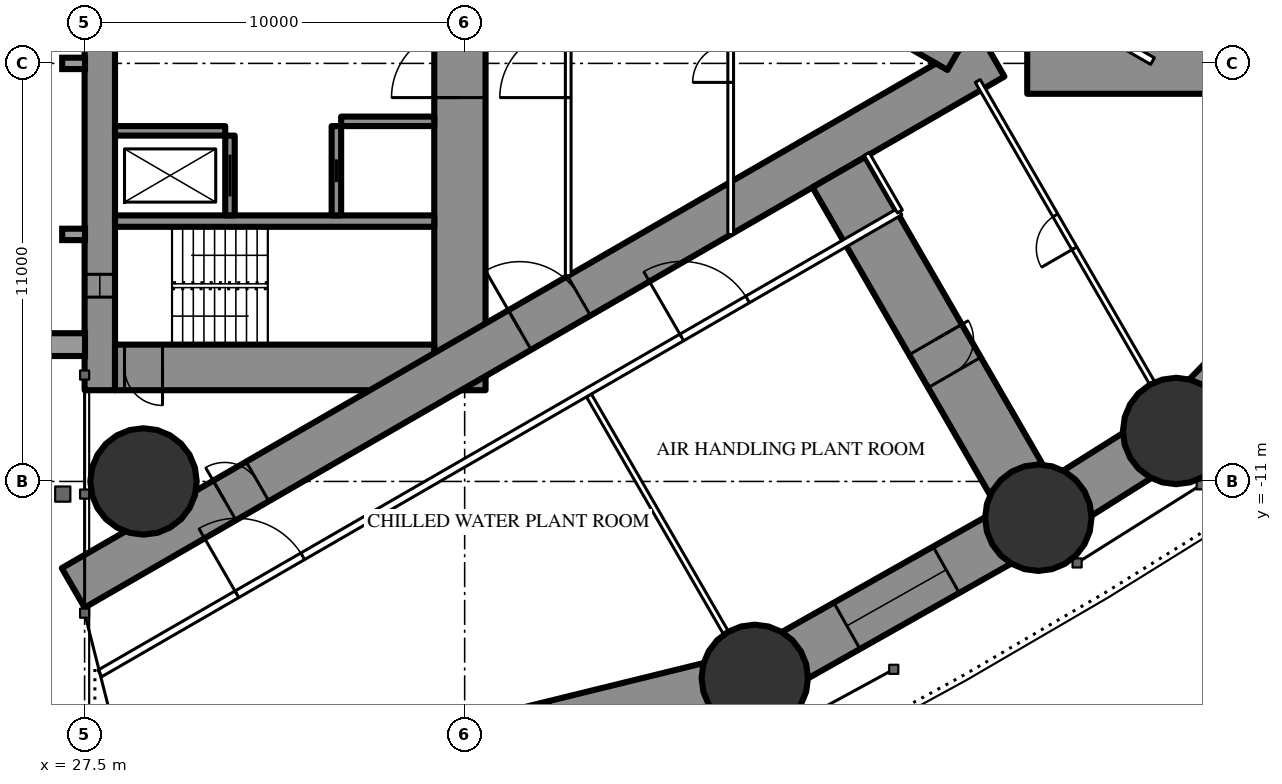
"""IFC4 building model, lengths in metres.
Left out: names, types, materials, properties, quantities, classifications, styles, units other than length and angle.
Written with IfcOpenShell. Run it as: python <this file> out.ifc"""

import sys

from ifc_helpers import new_model, si_unit, direction, frame, frame_2d, origin, origin_2d, place, context, subcontext, project, spatial, rectangle, circle, extrude, element, fill, save


model = new_model("IFC4")
c1 = context("Model", 3, precision=1e-05, world=origin(), true_north=direction((0.0, 1.0)))
c2 = subcontext(c1, "Body", "Model", "MODEL_VIEW")
j1 = project(units=[si_unit("LENGTHUNIT", "METRE"), si_unit("PLANEANGLEUNIT", "RADIAN")], contexts=[c1])
p1 = place(None, origin())
s1 = spatial("IfcSite", under=j1, at=p1, CompositionType="ELEMENT")
p2 = place(p1, origin())
s2 = spatial("IfcBuilding", under=s1, at=p2, CompositionType="ELEMENT")
p3 = place(p2, frame((0.0, 0.0, 152.7)))
s3 = spatial("IfcBuildingStorey", under=s2, at=p3, CompositionType="ELEMENT", Elevation=152.7)
for number, where, z_axis, x_axis in (
    (1, (29.05, -11.0, 0.0), (0.0, 0.0, 1.0), (1.0, 0.0, 0.0)),
    (2, (45.134, -16.168, 0.0), (0.0, 0.0, 1.0), (1.0, 0.0, 0.0)),
    (3, (52.594, -11.955, 0.0), (0.0, 0.0, 1.0), (1.0, 0.0, 0.0)),
    (4, (56.221, -9.672, 0.0), (0.0, 0.0, 1.0), (1.0, 0.0, 0.0)),
):
    element("IfcColumn", number, at=place(p3, frame(where, z_axis=z_axis, x_axis=x_axis)), inside=s3, PredefinedType="COLUMN", context=c2, shape_type="SweptSolid", body=[
        extrude(circle(Radius=1.4, at=origin_2d()), origin(), (0.0, 0.0, 1.0), 3.6),
    ])
p4 = place(p3, frame((27.9, -8.6, 0.0), z_axis=(0.0, 0.0, 1.0), x_axis=(0.0, 1.0, 0.0)))
e5 = element("IfcWall", 5, at=p4, inside=s3, PredefinedType="SHEAR", context=c2, shape_type="SweptSolid", body=[
    extrude(rectangle(XDim=17.2, YDim=0.8, at=frame_2d((8.6, 0.0))), origin(), (0.0, 0.0, 1.0), 3.6),
])
p5 = place(p4, frame((2.45, 0.0, 0.6)))
e6 = element("IfcOpeningElement", 6, at=p5, cuts=e5, PredefinedType="OPENING", context=c2, shape_type="SweptSolid", body=[
    extrude(rectangle(XDim=0.6, YDim=2.1, at=frame_2d((0.3, 1.05))), frame((0.0, 0.41, 0.0), z_axis=(0.0, -1.0, 0.0), x_axis=(1.0, 0.0, 0.0)), (0.0, 0.0, 1.0), 0.82),
])
p6 = place(p4, frame((14.15, 0.0, 0.6)))
e7 = element("IfcOpeningElement", 7, at=p6, cuts=e5, PredefinedType="OPENING", context=c2, shape_type="SweptSolid", body=[
    extrude(rectangle(XDim=0.6, YDim=2.1, at=frame_2d((0.3, 1.05))), frame((0.0, 0.41, 0.0), z_axis=(0.0, -1.0, 0.0), x_axis=(1.0, 0.0, 0.0)), (0.0, 0.0, 1.0), 0.82),
])
p7 = place(p3, frame((37.375, -8.6, 0.0), z_axis=(0.0, 0.0, 1.0), x_axis=(0.0, 1.0, 0.0)))
e8 = element("IfcWall", 8, at=p7, inside=s3, PredefinedType="SHEAR", context=c2, shape_type="SweptSolid", body=[
    extrude(rectangle(XDim=17.2, YDim=1.35, at=frame_2d((8.6, 0.0))), origin(), (0.0, 0.0, 1.0), 3.6),
])
p8 = place(p7, frame((7.7, 0.0, 0.0)))
e9 = element("IfcOpeningElement", 9, at=p8, cuts=e8, PredefinedType="OPENING", context=c2, shape_type="SweptSolid", body=[
    extrude(rectangle(XDim=1.8, YDim=2.2, at=frame_2d((0.9, 1.1))), frame((0.0, 0.685, 0.0), z_axis=(0.0, -1.0, 0.0), x_axis=(1.0, 0.0, 0.0)), (0.0, 0.0, 1.0), 1.37),
])
p9 = place(p3, frame((28.3, -8.0, 0.0), z_axis=(0.0, 0.0, 1.0), x_axis=(1.0, 0.0, 0.0)))
e10 = element("IfcWall", 10, at=p9, inside=s3, PredefinedType="SHEAR", context=c2, shape_type="SweptSolid", body=[
    extrude(rectangle(XDim=8.4, YDim=1.2, at=frame_2d((4.2, 0.0))), origin(), (0.0, 0.0, 1.0), 3.6),
])
p10 = place(p9, frame((0.25, 0.0, 0.0)))
e11 = element("IfcOpeningElement", 11, at=p10, cuts=e10, PredefinedType="OPENING", context=c2, shape_type="SweptSolid", body=[
    extrude(rectangle(XDim=1.0, YDim=2.2, at=frame_2d((0.5, 1.1))), frame((0.0, 0.61, 0.0), z_axis=(0.0, -1.0, 0.0), x_axis=(1.0, 0.0, 0.0)), (0.0, 0.0, 1.0), 1.22),
])
p11 = place(p3, frame((28.3, -4.15, 0.0), z_axis=(0.0, 0.0, 1.0), x_axis=(1.0, 0.0, 0.0)))
e12 = element("IfcWall", 12, at=p11, inside=s3, PredefinedType="SHEAR", context=c2, shape_type="SweptSolid", body=[
    extrude(rectangle(XDim=8.4, YDim=0.3, at=frame_2d((4.2, 0.0))), origin(), (0.0, 0.0, 1.0), 3.6),
])
p12 = place(p3, frame((31.325, -4.0, 0.0), z_axis=(0.0, 0.0, 1.0), x_axis=(0.0, 1.0, 0.0)))
e13 = element("IfcWall", 13, at=p12, inside=s3, PredefinedType="SHEAR", context=c2, shape_type="SweptSolid", body=[
    extrude(rectangle(XDim=2.1, YDim=0.25, at=frame_2d((1.05, 0.0))), origin(), (0.0, 0.0, 1.0), 3.6),
])
p13 = place(p12, frame((0.5, 0.0, 0.0)))
e14 = element("IfcOpeningElement", 14, at=p13, cuts=e13, PredefinedType="OPENING", context=c2, shape_type="SweptSolid", body=[
    extrude(rectangle(XDim=1.1, YDim=2.2, at=frame_2d((0.55, 1.1))), frame((0.0, 0.135, 0.0), z_axis=(0.0, -1.0, 0.0), x_axis=(1.0, 0.0, 0.0)), (0.0, 0.0, 1.0), 0.27),
])
p14 = place(p3, frame((34.125, -4.0, 0.0), z_axis=(0.0, 0.0, 1.0), x_axis=(0.0, 1.0, 0.0)))
e15 = element("IfcWall", 15, at=p14, inside=s3, PredefinedType="SHEAR", context=c2, shape_type="SweptSolid", body=[
    extrude(rectangle(XDim=2.35, YDim=0.25, at=frame_2d((1.175, 0.0))), origin(), (0.0, 0.0, 1.0), 3.6),
])
p15 = place(p14, frame((0.875, 0.0, 0.0)))
e16 = element("IfcOpeningElement", 16, at=p15, cuts=e15, PredefinedType="OPENING", context=c2, shape_type="SweptSolid", body=[
    extrude(rectangle(XDim=0.6, YDim=2.0, at=frame_2d((0.3, 1.0))), frame((0.0, 0.135, 0.0), z_axis=(0.0, -1.0, 0.0), x_axis=(1.0, 0.0, 0.0)), (0.0, 0.0, 1.0), 0.27),
])
p16 = place(p3, frame((28.3, -1.775, 0.0), z_axis=(0.0, 0.0, 1.0), x_axis=(1.0, 0.0, 0.0)))
e17 = element("IfcWall", 17, at=p16, inside=s3, PredefinedType="SHEAR", context=c2, shape_type="SweptSolid", body=[
    extrude(rectangle(XDim=2.9, YDim=0.25, at=frame_2d((1.45, 0.0))), origin(), (0.0, 0.0, 1.0), 3.6),
])
p17 = place(p3, frame((34.25, -1.525, 0.0), z_axis=(0.0, 0.0, 1.0), x_axis=(1.0, 0.0, 0.0)))
e18 = element("IfcWall", 18, at=p17, inside=s3, PredefinedType="SHEAR", context=c2, shape_type="SweptSolid", body=[
    extrude(rectangle(XDim=2.45, YDim=0.25, at=frame_2d((1.225, 0.0))), origin(), (0.0, 0.0, 1.0), 3.6),
])
p18 = place(p3, frame((27.2, -13.8, 0.0), z_axis=(0.0, 0.0, 1.0), x_axis=(0.866027159892, 0.499996958321, 0.0)))
e19 = element("IfcWall", 19, at=p18, inside=s3, PredefinedType="SHEAR", context=c2, shape_type="SweptSolid", body=[
    extrude(rectangle(XDim=27.947, YDim=1.2, at=frame_2d((13.973, 0.0))), origin(), (0.0, 0.0, 1.0), 3.6),
])
p19 = place(p18, frame((4.6, 0.0, 0.0)))
e20 = element("IfcOpeningElement", 20, at=p19, cuts=e19, PredefinedType="OPENING", context=c2, shape_type="SweptSolid", body=[
    extrude(rectangle(XDim=1.0, YDim=2.2, at=frame_2d((0.5, 1.1))), frame((0.0, 0.61, 0.0), z_axis=(0.0, -1.0, 0.0), x_axis=(1.0, 0.0, 0.0)), (0.0, 0.0, 1.0), 1.22),
])
p20 = place(p18, frame((13.568, 0.0, 0.0)))
e21 = element("IfcOpeningElement", 21, at=p20, cuts=e19, PredefinedType="OPENING", context=c2, shape_type="SweptSolid", body=[
    extrude(rectangle(XDim=1.8, YDim=2.04, at=frame_2d((0.9, 1.02))), frame((0.0, 0.61, 0.0), z_axis=(0.0, -1.0, 0.0), x_axis=(1.0, 0.0, 0.0)), (0.0, 0.0, 1.0), 1.22),
])
p21 = place(p3, frame((27.2, 13.8, 0.0), z_axis=(0.0, 0.0, 1.0), x_axis=(0.866024515034, -0.500001539357, 0.0)))
e22 = element("IfcWall", 22, at=p21, inside=s3, PredefinedType="SHEAR", context=c2, shape_type="SweptSolid", body=[
    extrude(rectangle(XDim=26.907, YDim=1.2, at=frame_2d((13.454, 0.0))), origin(), (0.0, 0.0, 1.0), 3.6),
])
p22 = place(p21, frame((4.6, 0.0, 0.0)))
e23 = element("IfcOpeningElement", 23, at=p22, cuts=e22, PredefinedType="OPENING", context=c2, shape_type="SweptSolid", body=[
    extrude(rectangle(XDim=1.0, YDim=2.2, at=frame_2d((0.5, 1.1))), frame((0.0, 0.61, 0.0), z_axis=(0.0, -1.0, 0.0), x_axis=(1.0, 0.0, 0.0)), (0.0, 0.0, 1.0), 1.22),
])
p23 = place(p21, frame((13.568, 0.0, 0.0)))
e24 = element("IfcOpeningElement", 24, at=p23, cuts=e22, PredefinedType="OPENING", context=c2, shape_type="SweptSolid", body=[
    extrude(rectangle(XDim=1.8, YDim=2.04, at=frame_2d((0.9, 1.02))), frame((0.0, 0.61, 0.0), z_axis=(0.0, -1.0, 0.0), x_axis=(1.0, 0.0, 0.0)), (0.0, 0.0, 1.0), 1.22),
])
p24 = place(p3, frame((47.345, -2.862, 0.0), z_axis=(0.0, 0.0, 1.0), x_axis=(0.500012973899, -0.866017913171, 0.0)))
e25 = element("IfcWall", 25, at=p24, inside=s3, PredefinedType="SHEAR", context=c2, shape_type="SweptSolid", body=[
    extrude(rectangle(XDim=10.499, YDim=1.6, at=frame_2d((5.25, 0.0))), origin(), (0.0, 0.0, 1.0), 3.6),
])
p25 = place(p24, frame((5.087, 0.0, 0.0)))
e26 = element("IfcOpeningElement", 26, at=p25, cuts=e25, PredefinedType="OPENING", context=c2, shape_type="SweptSolid", body=[
    extrude(rectangle(XDim=1.0, YDim=2.2, at=frame_2d((0.5, 1.1))), frame((0.0, 0.81, 0.0), z_axis=(0.0, -1.0, 0.0), x_axis=(1.0, 0.0, 0.0)), (0.0, 0.0, 1.0), 1.62),
])
p26 = place(p3, frame((52.302, 0.0, 0.0), z_axis=(0.0, 0.0, 1.0), x_axis=(1.0, 0.0, 0.0)))
e27 = element("IfcWall", 27, at=p26, inside=s3, PredefinedType="SHEAR", context=c2, shape_type="SweptSolid", body=[
    extrude(rectangle(XDim=9.198, YDim=1.6, at=frame_2d((4.599, 0.0))), origin(), (0.0, 0.0, 1.0), 3.6),
])
p27 = place(p3, frame((31.76, -19.456, 0.0), z_axis=(0.0, 0.0, 1.0), x_axis=(0.971093253227, 0.238700426344, 0.0)))
e28 = element("IfcWall", 28, at=p27, inside=s3, PredefinedType="SHEAR", context=c2, shape_type="SweptSolid", body=[
    extrude(rectangle(XDim=13.772, YDim=1.4, at=frame_2d((6.886, 0.0))), origin(), (0.0, 0.0, 1.0), 3.6),
])
p28 = place(p27, frame((5.386, 0.0, 0.6)))
e29 = element("IfcOpeningElement", 29, at=p28, cuts=e28, PredefinedType="OPENING", context=c2, shape_type="SweptSolid", body=[
    extrude(rectangle(XDim=3.0, YDim=1.2, at=frame_2d((1.5, 0.6))), frame((0.0, 0.71, 0.0), z_axis=(0.0, -1.0, 0.0), x_axis=(1.0, 0.0, 0.0)), (0.0, 0.0, 1.0), 1.42),
])
p29 = place(p3, frame((45.134, -16.168, 0.0), z_axis=(0.0, 0.0, 1.0), x_axis=(0.870721990329, 0.491775574381, 0.0)))
e30 = element("IfcWall", 30, at=p29, inside=s3, PredefinedType="SHEAR", context=c2, shape_type="SweptSolid", body=[
    extrude(rectangle(XDim=8.569, YDim=1.4, at=frame_2d((4.284, 0.0))), origin(), (0.0, 0.0, 1.0), 3.6),
])
p30 = place(p29, frame((2.784, 0.0, 0.6)))
e31 = element("IfcOpeningElement", 31, at=p30, cuts=e30, PredefinedType="OPENING", context=c2, shape_type="SweptSolid", body=[
    extrude(rectangle(XDim=3.0, YDim=1.2, at=frame_2d((1.5, 0.6))), frame((0.0, 0.71, 0.0), z_axis=(0.0, -1.0, 0.0), x_axis=(1.0, 0.0, 0.0)), (0.0, 0.0, 1.0), 1.42),
])
p31 = place(p3, frame((52.594, -11.955, 0.0), z_axis=(0.0, 0.0, 1.0), x_axis=(0.846348902569, 0.532628890617, 0.0)))
e32 = element("IfcWall", 32, at=p31, inside=s3, PredefinedType="SHEAR", context=c2, shape_type="SweptSolid", body=[
    extrude(rectangle(XDim=4.285, YDim=1.4, at=frame_2d((2.143, 0.0))), origin(), (0.0, 0.0, 1.0), 3.6),
])
p32 = place(p3, frame((56.221, -9.672, 0.0), z_axis=(0.0, 0.0, 1.0), x_axis=(0.697649905443, 0.716438838587, 0.0)))
e33 = element("IfcWall", 33, at=p32, inside=s3, PredefinedType="SHEAR", context=c2, shape_type="SweptSolid", body=[
    extrude(rectangle(XDim=13.501, YDim=1.4, at=frame_2d((6.75, 0.0))), origin(), (0.0, 0.0, 1.0), 3.6),
])
p33 = place(p32, frame((5.25, 0.0, 0.6)))
e34 = element("IfcOpeningElement", 34, at=p33, cuts=e33, PredefinedType="OPENING", context=c2, shape_type="SweptSolid", body=[
    extrude(rectangle(XDim=3.0, YDim=1.2, at=frame_2d((1.5, 0.6))), frame((0.0, 0.71, 0.0), z_axis=(0.0, -1.0, 0.0), x_axis=(1.0, 0.0, 0.0)), (0.0, 0.0, 1.0), 1.42),
])
p34 = place(p3, frame((65.64, 0.0, 0.0), z_axis=(0.0, 0.0, 1.0), x_axis=(-0.697649905443, 0.716438838587, 0.0)))
e35 = element("IfcWall", 35, at=p34, inside=s3, PredefinedType="SHEAR", context=c2, shape_type="SweptSolid", body=[
    extrude(rectangle(XDim=13.501, YDim=1.4, at=frame_2d((6.75, 0.0))), origin(), (0.0, 0.0, 1.0), 3.6),
])
p35 = place(p34, frame((5.25, 0.0, 0.6)))
e36 = element("IfcOpeningElement", 36, at=p35, cuts=e35, PredefinedType="OPENING", context=c2, shape_type="SweptSolid", body=[
    extrude(rectangle(XDim=3.0, YDim=1.2, at=frame_2d((1.5, 0.6))), frame((0.0, 0.71, 0.0), z_axis=(0.0, -1.0, 0.0), x_axis=(1.0, 0.0, 0.0)), (0.0, 0.0, 1.0), 1.42),
])
p36 = place(p3, frame((40.769, -8.737, 0.0), z_axis=(0.0, 0.0, 1.0), x_axis=(0.500013115284, -0.866017831539, 0.0)))
e37 = element("IfcWall", 37, at=p36, inside=s3, PredefinedType="PARTITIONING", context=c2, shape_type="SweptSolid", body=[
    extrude(rectangle(XDim=7.198, YDim=0.15, at=frame_2d((3.599, 0.0))), origin(), (0.0, 0.0, 1.0), 2.4),
])
p37 = place(p3, frame((55.583, -8.401, 0.0), z_axis=(0.0, 0.0, 1.0), x_axis=(-0.499997575924, 0.866026803321, 0.0)))
e38 = element("IfcWall", 38, at=p37, inside=s3, PredefinedType="PARTITIONING", context=c2, shape_type="SweptSolid", body=[
    extrude(rectangle(XDim=9.167, YDim=0.15, at=frame_2d((4.583, 0.0))), origin(), (0.0, 0.0, 1.0), 3.35),
])
p38 = place(p37, frame((4.083, 0.0, 0.0)))
e39 = element("IfcOpeningElement", 39, at=p38, cuts=e38, PredefinedType="OPENING", context=c2, shape_type="SweptSolid", body=[
    extrude(rectangle(XDim=1.0, YDim=2.2, at=frame_2d((0.5, 1.1))), frame((0.0, 0.085, 0.0), z_axis=(0.0, -1.0, 0.0), x_axis=(1.0, 0.0, 0.0)), (0.0, 0.0, 1.0), 0.17),
])
p39 = place(p3, frame((52.639, 1.769, 0.0), z_axis=(0.0, 0.0, 1.0), x_axis=(0.866027340901, -0.4999966448, 0.0)))
e40 = element("IfcWall", 40, at=p39, inside=s3, PredefinedType="PARTITIONING", context=c2, shape_type="SweptSolid", body=[
    extrude(rectangle(XDim=3.417, YDim=0.2, at=frame_2d((1.708, 0.0))), origin(), (0.0, 0.0, 1.0), 3.35),
])
p40 = place(p3, frame((27.903, -16.05, 0.0), z_axis=(0.0, 0.0, 1.0), x_axis=(0.86602417537, 0.500002127671, 0.0)))
e41 = element("IfcWall", 41, at=p40, inside=s3, PredefinedType="PARTITIONING", context=c2, shape_type="SweptSolid", body=[
    extrude(rectangle(XDim=24.307, YDim=0.2, at=frame_2d((12.153, 0.0))), origin(), (0.0, 0.0, 1.0), 3.35),
])
p41 = place(p40, frame((4.162, 0.0, 0.0)))
e42 = element("IfcOpeningElement", 42, at=p41, cuts=e41, PredefinedType="OPENING", context=c2, shape_type="SweptSolid", body=[
    extrude(rectangle(XDim=2.0, YDim=2.4, at=frame_2d((1.0, 1.2))), frame((0.0, 0.11, 0.0), z_axis=(0.0, -1.0, 0.0), x_axis=(1.0, 0.0, 0.0)), (0.0, 0.0, 1.0), 0.22),
])
p42 = place(p40, frame((17.678, 0.0, 0.0)))
e43 = element("IfcOpeningElement", 43, at=p42, cuts=e41, PredefinedType="OPENING", context=c2, shape_type="SweptSolid", body=[
    extrude(rectangle(XDim=2.0, YDim=2.4, at=frame_2d((1.0, 1.2))), frame((0.0, 0.11, 0.0), z_axis=(0.0, -1.0, 0.0), x_axis=(1.0, 0.0, 0.0)), (0.0, 0.0, 1.0), 0.22),
])
p43 = place(p3, frame((48.953, -3.897, 0.0), z_axis=(0.0, 0.0, 1.0), x_axis=(-0.499980071345, 0.866036909293, 0.0)))
e44 = element("IfcWall", 44, at=p43, inside=s3, PredefinedType="PARTITIONING", context=c2, shape_type="SweptSolid", body=[
    extrude(rectangle(XDim=1.75, YDim=0.15, at=frame_2d((0.875, 0.0))), origin(), (0.0, 0.0, 1.0), 3.35),
])
p44 = place(p3, frame((40.225, -5.587, 0.0), z_axis=(0.0, 0.0, 1.0), x_axis=(0.0, 1.0, 0.0)))
e45 = element("IfcWall", 45, at=p44, inside=s3, PredefinedType="PARTITIONING", context=c2, shape_type="SweptSolid", body=[
    extrude(rectangle(XDim=11.174, YDim=0.15, at=frame_2d((5.587, 0.0))), origin(), (0.0, 0.0, 1.0), 3.35),
])
p45 = place(p44, frame((4.687, 0.0, 0.0)))
e46 = element("IfcOpeningElement", 46, at=p45, cuts=e45, PredefinedType="OPENING", context=c2, shape_type="SweptSolid", body=[
    extrude(rectangle(XDim=1.8, YDim=2.2, at=frame_2d((0.9, 1.1))), frame((0.0, 0.085, 0.0), z_axis=(0.0, -1.0, 0.0), x_axis=(1.0, 0.0, 0.0)), (0.0, 0.0, 1.0), 0.17),
])
p46 = place(p3, frame((44.5, -4.505, 0.0), z_axis=(0.0, 0.0, 1.0), x_axis=(0.0, 1.0, 0.0)))
e47 = element("IfcWall", 47, at=p46, inside=s3, PredefinedType="PARTITIONING", context=c2, shape_type="SweptSolid", body=[
    extrude(rectangle(XDim=9.009, YDim=0.15, at=frame_2d((4.505, 0.0))), origin(), (0.0, 0.0, 1.0), 3.35),
])
p47 = place(p46, frame((4.005, 0.0, 0.0)))
e48 = element("IfcOpeningElement", 48, at=p47, cuts=e47, PredefinedType="OPENING", context=c2, shape_type="SweptSolid", body=[
    extrude(rectangle(XDim=1.0, YDim=2.2, at=frame_2d((0.5, 1.1))), frame((0.0, 0.085, 0.0), z_axis=(0.0, -1.0, 0.0), x_axis=(1.0, 0.0, 0.0)), (0.0, 0.0, 1.0), 0.17),
])
p48 = place(p30, origin())
e49 = element("IfcWindow", 49, at=p48, inside=s3, PartitioningType="SINGLE_PANEL", PredefinedType="WINDOW", context=c2, shape_type="SweptSolid", body=[
    extrude(rectangle(XDim=3.0, YDim=1.2, at=frame_2d((1.5, 0.6))), frame((0.0, 0.03, 0.0), z_axis=(0.0, -1.0, 0.0), x_axis=(1.0, 0.0, 0.0)), (0.0, 0.0, 1.0), 0.06),
])
fill(e31, e49)
p49 = place(p41, origin())
e50 = element("IfcDoor", 50, at=p49, inside=s3, OperationType="DOUBLE_DOOR_SINGLE_SWING", PredefinedType="DOOR", context=c2, shape_type="SweptSolid", body=[
    extrude(rectangle(XDim=2.0, YDim=2.4, at=frame_2d((1.0, 1.2))), frame((0.0, 0.025, 0.0), z_axis=(0.0, -1.0, 0.0), x_axis=(1.0, 0.0, 0.0)), (0.0, 0.0, 1.0), 0.05),
])
fill(e42, e50)
p50 = place(p42, origin())
e51 = element("IfcDoor", 51, at=p50, inside=s3, OperationType="DOUBLE_DOOR_SINGLE_SWING", PredefinedType="DOOR", context=c2, shape_type="SweptSolid", body=[
    extrude(rectangle(XDim=2.0, YDim=2.4, at=frame_2d((1.0, 1.2))), frame((0.0, 0.025, 0.0), z_axis=(0.0, -1.0, 0.0), x_axis=(1.0, 0.0, 0.0)), (0.0, 0.0, 1.0), 0.05),
])
fill(e43, e51)
p51 = place(p25, origin())
e52 = element("IfcDoor", 52, at=p51, inside=s3, OperationType="SINGLE_SWING_LEFT", PredefinedType="DOOR", context=c2, shape_type="SweptSolid", body=[
    extrude(rectangle(XDim=1.0, YDim=2.2, at=frame_2d((0.5, 1.1))), frame((0.0, 0.025, 0.0), z_axis=(0.0, -1.0, 0.0), x_axis=(1.0, 0.0, 0.0)), (0.0, 0.0, 1.0), 0.05),
])
fill(e26, e52)
p52 = place(p38, origin())
e53 = element("IfcDoor", 53, at=p52, inside=s3, OperationType="SINGLE_SWING_LEFT", PredefinedType="DOOR", context=c2, shape_type="SweptSolid", body=[
    extrude(rectangle(XDim=1.0, YDim=2.2, at=frame_2d((0.5, 1.1))), frame((0.0, 0.025, 0.0), z_axis=(0.0, -1.0, 0.0), x_axis=(1.0, 0.0, 0.0)), (0.0, 0.0, 1.0), 0.05),
])
fill(e39, e53)
p53 = place(p45, origin())
e54 = element("IfcDoor", 54, at=p53, inside=s3, OperationType="DOUBLE_DOOR_SINGLE_SWING", PredefinedType="DOOR", context=c2, shape_type="SweptSolid", body=[
    extrude(rectangle(XDim=1.8, YDim=2.2, at=frame_2d((0.9, 1.1))), frame((0.0, 0.025, 0.0), z_axis=(0.0, -1.0, 0.0), x_axis=(1.0, 0.0, 0.0)), (0.0, 0.0, 1.0), 0.05),
])
fill(e46, e54)
p54 = place(p47, origin())
e55 = element("IfcDoor", 55, at=p54, inside=s3, OperationType="SINGLE_SWING_LEFT", PredefinedType="DOOR", context=c2, shape_type="SweptSolid", body=[
    extrude(rectangle(XDim=1.0, YDim=2.2, at=frame_2d((0.5, 1.1))), frame((0.0, 0.025, 0.0), z_axis=(0.0, -1.0, 0.0), x_axis=(1.0, 0.0, 0.0)), (0.0, 0.0, 1.0), 0.05),
])
fill(e48, e55)
p55 = place(p19, origin())
e56 = element("IfcDoor", 56, at=p55, inside=s3, OperationType="SINGLE_SWING_LEFT", PredefinedType="DOOR", context=c2, shape_type="SweptSolid", body=[
    extrude(rectangle(XDim=1.0, YDim=2.2, at=frame_2d((0.5, 1.1))), frame((0.0, 0.025, 0.0), z_axis=(0.0, -1.0, 0.0), x_axis=(1.0, 0.0, 0.0)), (0.0, 0.0, 1.0), 0.05),
])
fill(e20, e56)
p56 = place(p20, origin())
e57 = element("IfcDoor", 57, at=p56, inside=s3, OperationType="DOUBLE_DOOR_SINGLE_SWING", PredefinedType="DOOR", context=c2, shape_type="SweptSolid", body=[
    extrude(rectangle(XDim=1.8, YDim=2.04, at=frame_2d((0.9, 1.02))), frame((0.0, 0.025, 0.0), z_axis=(0.0, -1.0, 0.0), x_axis=(1.0, 0.0, 0.0)), (0.0, 0.0, 1.0), 0.05),
])
fill(e21, e57)
p57 = place(p8, origin())
e58 = element("IfcDoor", 58, at=p57, inside=s3, OperationType="DOUBLE_DOOR_SINGLE_SWING", PredefinedType="DOOR", context=c2, shape_type="SweptSolid", body=[
    extrude(rectangle(XDim=1.8, YDim=2.2, at=frame_2d((0.9, 1.1))), frame((0.0, 0.025, 0.0), z_axis=(0.0, -1.0, 0.0), x_axis=(1.0, 0.0, 0.0)), (0.0, 0.0, 1.0), 0.05),
])
fill(e9, e58)
p58 = place(p10, origin())
e59 = element("IfcDoor", 59, at=p58, inside=s3, OperationType="SINGLE_SWING_RIGHT", PredefinedType="DOOR", context=c2, shape_type="SweptSolid", body=[
    extrude(rectangle(XDim=1.0, YDim=2.2, at=frame_2d((0.5, 1.1))), frame((0.0, 0.025, 0.0), z_axis=(0.0, -1.0, 0.0), x_axis=(1.0, 0.0, 0.0)), (0.0, 0.0, 1.0), 0.05),
])
fill(e11, e59)
p59 = place(p13, origin())
e60 = element("IfcDoor", 60, at=p59, inside=s3, OperationType="SLIDING_TO_LEFT", PredefinedType="USERDEFINED", context=c2, shape_type="SweptSolid", body=[
    extrude(rectangle(XDim=1.1, YDim=2.2, at=frame_2d((0.55, 1.1))), frame((0.0, 0.025, 0.0), z_axis=(0.0, -1.0, 0.0), x_axis=(1.0, 0.0, 0.0)), (0.0, 0.0, 1.0), 0.05),
])
fill(e14, e60)
p60 = place(p15, origin())
e61 = element("IfcDoor", 61, at=p60, inside=s3, OperationType="SLIDING_TO_LEFT", PredefinedType="DOOR", context=c2, shape_type="SweptSolid", body=[
    extrude(rectangle(XDim=0.6, YDim=2.0, at=frame_2d((0.3, 1.0))), frame((0.0, 0.025, 0.0), z_axis=(0.0, -1.0, 0.0), x_axis=(1.0, 0.0, 0.0)), (0.0, 0.0, 1.0), 0.05),
])
fill(e16, e61)
p61 = place(p5, origin())
e62 = element("IfcWindow", 62, at=p61, inside=s3, PartitioningType="SINGLE_PANEL", PredefinedType="WINDOW", context=c2, shape_type="SweptSolid", body=[
    extrude(rectangle(XDim=0.6, YDim=2.1, at=frame_2d((0.3, 1.05))), frame((0.0, 0.03, 0.0), z_axis=(0.0, -1.0, 0.0), x_axis=(1.0, 0.0, 0.0)), (0.0, 0.0, 1.0), 0.06),
])
fill(e6, e62)
save(model, sys.argv[1])
